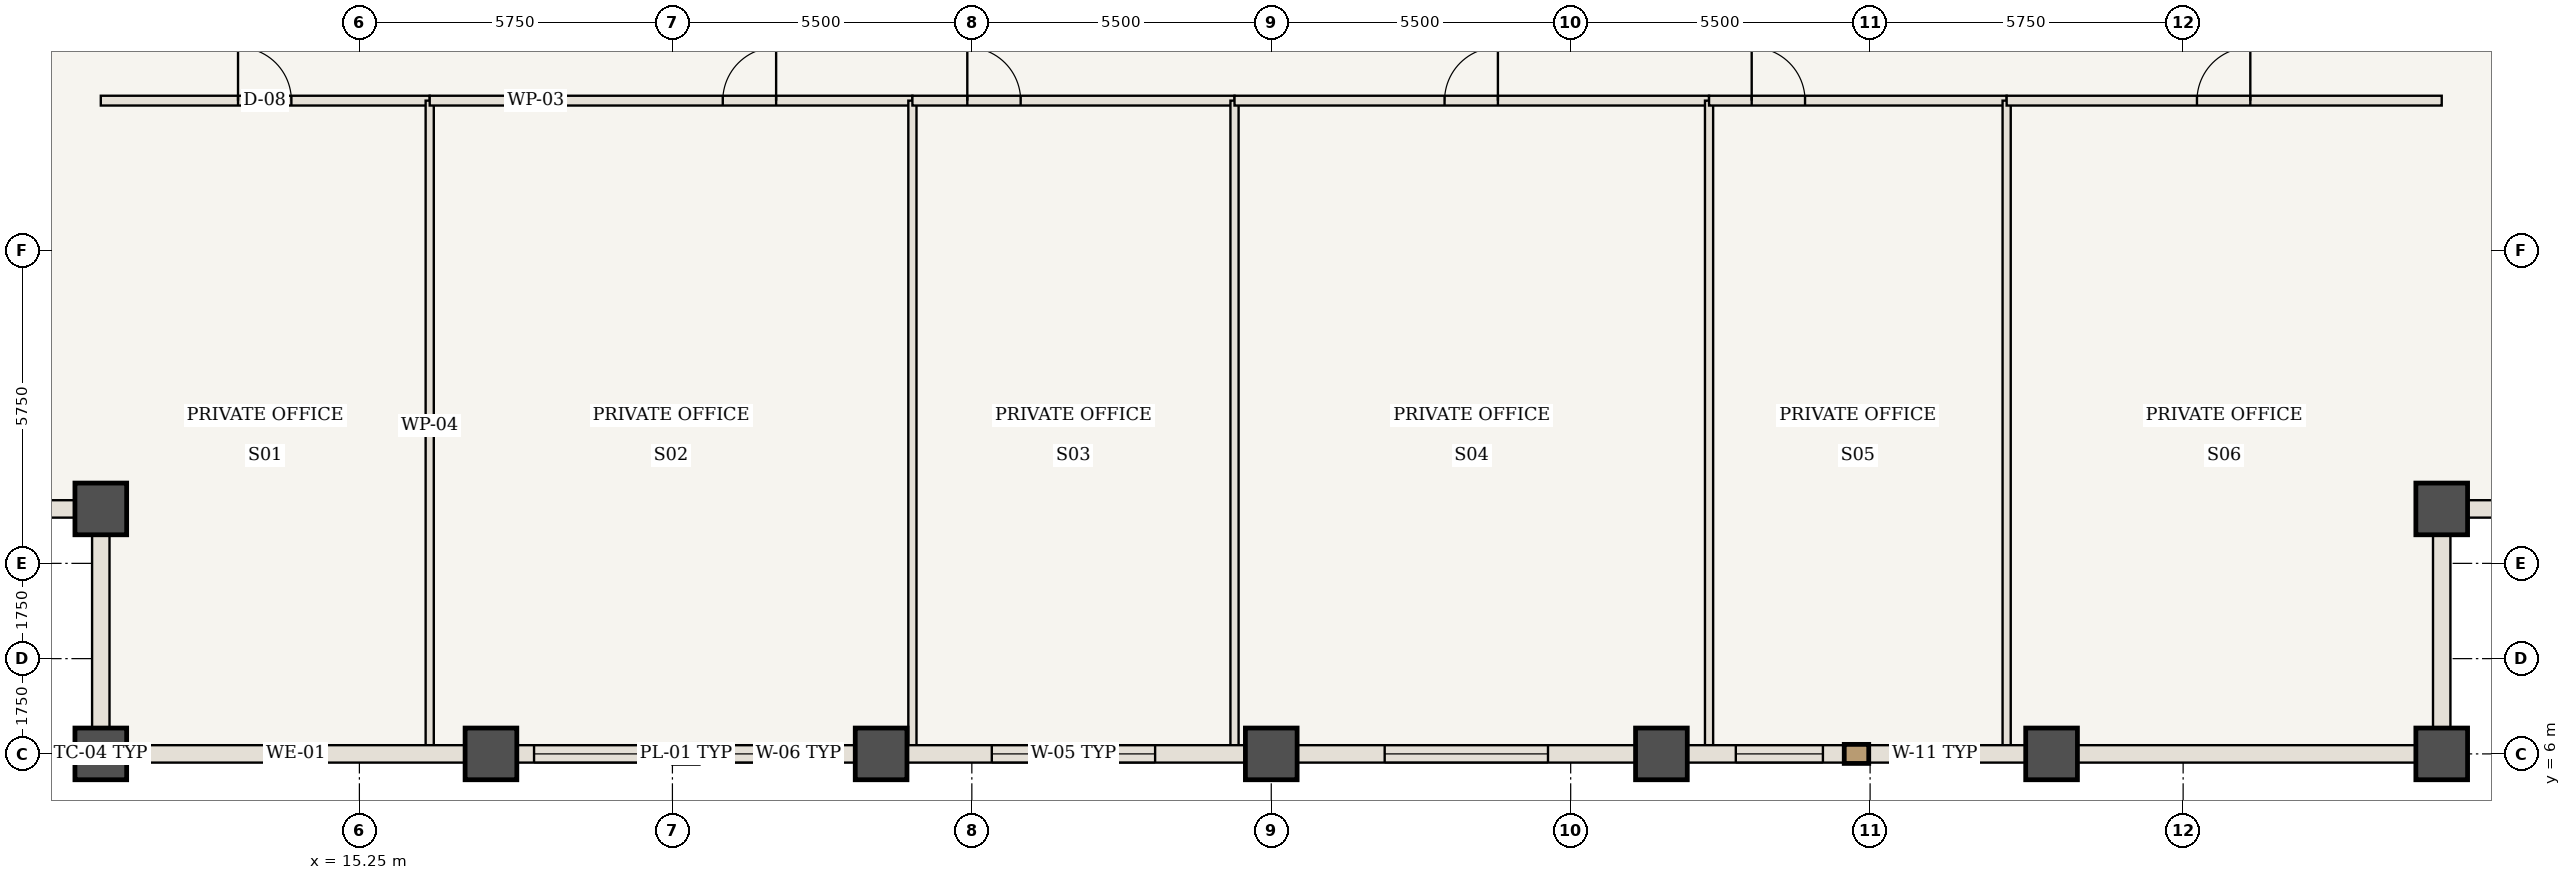
"""IFC4 building model, lengths in metres.
Left out: names, types, materials, properties, quantities, classifications, styles, units other than length and angle.
Written with IfcOpenShell. Run it as: python <this file> out.ifc"""

import sys

from ifc_helpers import new_model, si_unit, direction, frame, frame_2d, origin, origin_2d, place, context, subcontext, project, spatial, rectangle, extrude, element, fill, save


model = new_model("IFC4")
c1 = context("Model", 3, precision=1e-05, world=origin(), true_north=direction((0.0, 1.0)))
c2 = subcontext(c1, "Body", "Model", "MODEL_VIEW")
j1 = project(units=[si_unit("LENGTHUNIT", "METRE"), si_unit("PLANEANGLEUNIT", "RADIAN")], contexts=[c1])
p1 = place(None, origin())
s1 = spatial("IfcSite", under=j1, at=p1, CompositionType="ELEMENT")
p2 = place(p1, origin())
s2 = spatial("IfcBuilding", under=s1, at=p2, CompositionType="ELEMENT")
p3 = place(p2, frame((0.0, 0.0, 126.0)))
s3 = spatial("IfcBuildingStorey", under=s2, at=p3, CompositionType="ELEMENT", Elevation=126.0)
for number, where, z_axis, x_axis in (
    (1, (10.5, 6.0, 0.0), (0.0, 0.0, 1.0), (1.0, 0.0, 0.0)),
    (2, (10.5, 10.5, 0.0), (0.0, 0.0, 1.0), (1.0, 0.0, 0.0)),
    (3, (53.5, 6.0, 0.0), (0.0, 0.0, 1.0), (1.0, 0.0, 0.0)),
    (4, (53.5, 10.5, 0.0), (0.0, 0.0, 1.0), (1.0, 0.0, 0.0)),
    (5, (17.667, 6.0, 0.0), (0.0, 0.0, 1.0), (1.0, 0.0, 0.0)),
    (6, (24.833, 6.0, 0.0), (0.0, 0.0, 1.0), (1.0, 0.0, 0.0)),
    (7, (32.0, 6.0, 0.0), (0.0, 0.0, 1.0), (1.0, 0.0, 0.0)),
    (8, (39.167, 6.0, 0.0), (0.0, 0.0, 1.0), (1.0, 0.0, 0.0)),
    (9, (46.333, 6.0, 0.0), (0.0, 0.0, 1.0), (1.0, 0.0, 0.0)),
):
    element("IfcColumn", number, at=place(p3, frame(where, z_axis=z_axis, x_axis=x_axis)), inside=s3, PredefinedType="COLUMN", context=c2, shape_type="SweptSolid", body=[
        extrude(rectangle(XDim=0.95, YDim=0.95, at=origin_2d()), origin(), (0.0, 0.0, 1.0), 3.85),
    ])
p4 = place(p3, frame((10.5, 18.0, 0.0), z_axis=(0.0, 0.0, 1.0), x_axis=(1.0, 0.0, 0.0)))
e10 = element("IfcWall", 10, at=p4, inside=s3, PredefinedType="STANDARD", context=c2, shape_type="SweptSolid", body=[
    extrude(rectangle(XDim=6.042, YDim=0.18, at=frame_2d((3.021, 0.0))), origin(), (0.0, 0.0, 1.0), 3.685),
])
p5 = place(p4, frame((2.521, 0.0, 0.0)))
e11 = element("IfcOpeningElement", 11, at=p5, cuts=e10, PredefinedType="OPENING", context=c2, shape_type="SweptSolid", body=[
    extrude(rectangle(XDim=0.98, YDim=2.2, at=frame_2d((0.49, 1.1))), frame((0.0, 0.1, 0.0), z_axis=(0.0, -1.0, 0.0), x_axis=(1.0, 0.0, 0.0)), (0.0, 0.0, 1.0), 0.2),
])
p6 = place(p3, frame((16.542, 6.06, 0.0), z_axis=(0.0, 0.0, 1.0), x_axis=(0.0, 1.0, 0.0)))
e12 = element("IfcWall", 12, at=p6, inside=s3, PredefinedType="STANDARD", context=c2, shape_type="SweptSolid", body=[
    extrude(rectangle(XDim=11.94, YDim=0.15, at=frame_2d((5.97, 0.0))), origin(), (0.0, 0.0, 1.0), 3.685),
])
p7 = place(p3, frame((16.542, 18.0, 0.0), z_axis=(0.0, 0.0, 1.0), x_axis=(1.0, 0.0, 0.0)))
e13 = element("IfcWall", 13, at=p7, inside=s3, PredefinedType="STANDARD", context=c2, shape_type="SweptSolid", body=[
    extrude(rectangle(XDim=8.866, YDim=0.18, at=frame_2d((4.433, 0.0))), origin(), (0.0, 0.0, 1.0), 3.685),
])
p8 = place(p7, frame((5.383, 0.0, 0.0)))
e14 = element("IfcOpeningElement", 14, at=p8, cuts=e13, PredefinedType="OPENING", context=c2, shape_type="SweptSolid", body=[
    extrude(rectangle(XDim=0.98, YDim=2.2, at=frame_2d((0.49, 1.1))), frame((0.0, 0.1, 0.0), z_axis=(0.0, -1.0, 0.0), x_axis=(1.0, 0.0, 0.0)), (0.0, 0.0, 1.0), 0.2),
])
p9 = place(p3, frame((25.408, 6.06, 0.0), z_axis=(0.0, 0.0, 1.0), x_axis=(0.0, 1.0, 0.0)))
e15 = element("IfcWall", 15, at=p9, inside=s3, PredefinedType="STANDARD", context=c2, shape_type="SweptSolid", body=[
    extrude(rectangle(XDim=11.94, YDim=0.15, at=frame_2d((5.97, 0.0))), origin(), (0.0, 0.0, 1.0), 3.685),
])
p10 = place(p3, frame((25.408, 18.0, 0.0), z_axis=(0.0, 0.0, 1.0), x_axis=(1.0, 0.0, 0.0)))
e16 = element("IfcWall", 16, at=p10, inside=s3, PredefinedType="STANDARD", context=c2, shape_type="SweptSolid", body=[
    extrude(rectangle(XDim=5.917, YDim=0.18, at=frame_2d((2.958, 0.0))), origin(), (0.0, 0.0, 1.0), 3.685),
])
p11 = place(p10, frame((1.008, 0.0, 0.0)))
e17 = element("IfcOpeningElement", 17, at=p11, cuts=e16, PredefinedType="OPENING", context=c2, shape_type="SweptSolid", body=[
    extrude(rectangle(XDim=0.98, YDim=2.2, at=frame_2d((0.49, 1.1))), frame((0.0, 0.1, 0.0), z_axis=(0.0, -1.0, 0.0), x_axis=(1.0, 0.0, 0.0)), (0.0, 0.0, 1.0), 0.2),
])
p12 = place(p3, frame((31.325, 6.06, 0.0), z_axis=(0.0, 0.0, 1.0), x_axis=(0.0, 1.0, 0.0)))
e18 = element("IfcWall", 18, at=p12, inside=s3, PredefinedType="STANDARD", context=c2, shape_type="SweptSolid", body=[
    extrude(rectangle(XDim=11.94, YDim=0.15, at=frame_2d((5.97, 0.0))), origin(), (0.0, 0.0, 1.0), 3.685),
])
p13 = place(p3, frame((31.325, 18.0, 0.0), z_axis=(0.0, 0.0, 1.0), x_axis=(1.0, 0.0, 0.0)))
e19 = element("IfcWall", 19, at=p13, inside=s3, PredefinedType="STANDARD", context=c2, shape_type="SweptSolid", body=[
    extrude(rectangle(XDim=8.717, YDim=0.18, at=frame_2d((4.358, 0.0))), origin(), (0.0, 0.0, 1.0), 3.685),
])
p14 = place(p13, frame((3.858, 0.0, 0.0)))
e20 = element("IfcOpeningElement", 20, at=p14, cuts=e19, PredefinedType="OPENING", context=c2, shape_type="SweptSolid", body=[
    extrude(rectangle(XDim=0.98, YDim=2.2, at=frame_2d((0.49, 1.1))), frame((0.0, 0.1, 0.0), z_axis=(0.0, -1.0, 0.0), x_axis=(1.0, 0.0, 0.0)), (0.0, 0.0, 1.0), 0.2),
])
p15 = place(p3, frame((40.042, 6.06, 0.0), z_axis=(0.0, 0.0, 1.0), x_axis=(0.0, 1.0, 0.0)))
e21 = element("IfcWall", 21, at=p15, inside=s3, PredefinedType="STANDARD", context=c2, shape_type="SweptSolid", body=[
    extrude(rectangle(XDim=11.94, YDim=0.15, at=frame_2d((5.97, 0.0))), origin(), (0.0, 0.0, 1.0), 3.685),
])
p16 = place(p3, frame((40.042, 18.0, 0.0), z_axis=(0.0, 0.0, 1.0), x_axis=(1.0, 0.0, 0.0)))
e22 = element("IfcWall", 22, at=p16, inside=s3, PredefinedType="STANDARD", context=c2, shape_type="SweptSolid", body=[
    extrude(rectangle(XDim=5.467, YDim=0.18, at=frame_2d((2.733, 0.0))), origin(), (0.0, 0.0, 1.0), 3.685),
])
p17 = place(p16, frame((0.783, 0.0, 0.0)))
e23 = element("IfcOpeningElement", 23, at=p17, cuts=e22, PredefinedType="OPENING", context=c2, shape_type="SweptSolid", body=[
    extrude(rectangle(XDim=0.98, YDim=2.2, at=frame_2d((0.49, 1.1))), frame((0.0, 0.1, 0.0), z_axis=(0.0, -1.0, 0.0), x_axis=(1.0, 0.0, 0.0)), (0.0, 0.0, 1.0), 0.2),
])
p18 = place(p3, frame((45.508, 6.06, 0.0), z_axis=(0.0, 0.0, 1.0), x_axis=(0.0, 1.0, 0.0)))
e24 = element("IfcWall", 24, at=p18, inside=s3, PredefinedType="STANDARD", context=c2, shape_type="SweptSolid", body=[
    extrude(rectangle(XDim=11.94, YDim=0.15, at=frame_2d((5.97, 0.0))), origin(), (0.0, 0.0, 1.0), 3.685),
])
p19 = place(p3, frame((45.508, 18.0, 0.0), z_axis=(0.0, 0.0, 1.0), x_axis=(1.0, 0.0, 0.0)))
e25 = element("IfcWall", 25, at=p19, inside=s3, PredefinedType="STANDARD", context=c2, shape_type="SweptSolid", body=[
    extrude(rectangle(XDim=7.992, YDim=0.18, at=frame_2d((3.996, 0.0))), origin(), (0.0, 0.0, 1.0), 3.685),
])
p20 = place(p19, frame((3.496, 0.0, 0.0)))
e26 = element("IfcOpeningElement", 26, at=p20, cuts=e25, PredefinedType="OPENING", context=c2, shape_type="SweptSolid", body=[
    extrude(rectangle(XDim=0.98, YDim=2.2, at=frame_2d((0.49, 1.1))), frame((0.0, 0.1, 0.0), z_axis=(0.0, -1.0, 0.0), x_axis=(1.0, 0.0, 0.0)), (0.0, 0.0, 1.0), 0.2),
])
p21 = place(p3, frame((17.667, 6.0, 0.0), z_axis=(0.0, 0.0, 1.0), x_axis=(-1.0, 0.0, 0.0)))
e27 = element("IfcWall", 27, at=p21, inside=s3, PredefinedType="USERDEFINED", context=c2, shape_type="SweptSolid", body=[
    extrude(rectangle(XDim=7.167, YDim=0.32, at=frame_2d((3.583, 0.0))), origin(), (0.0, 0.0, 1.0), 2.885),
])
p22 = place(p3, frame((24.833, 6.0, 0.0), z_axis=(0.0, 0.0, 1.0), x_axis=(-1.0, 0.0, 0.0)))
e28 = element("IfcWall", 28, at=p22, inside=s3, PredefinedType="USERDEFINED", context=c2, shape_type="SweptSolid", body=[
    extrude(rectangle(XDim=7.167, YDim=0.32, at=frame_2d((3.583, 0.0))), origin(), (0.0, 0.0, 1.0), 2.885),
])
p23 = place(p22, frame((0.792, 0.0, 0.85)))
e29 = element("IfcOpeningElement", 29, at=p23, cuts=e28, PredefinedType="OPENING", context=c2, shape_type="SweptSolid", body=[
    extrude(rectangle(XDim=2.2, YDim=1.835, at=frame_2d((1.1, 0.917))), frame((0.0, 0.17, 0.0), z_axis=(0.0, -1.0, 0.0), x_axis=(1.0, 0.0, 0.0)), (0.0, 0.0, 1.0), 0.34),
])
p24 = place(p22, frame((4.175, 0.0, 0.85)))
e30 = element("IfcOpeningElement", 30, at=p24, cuts=e28, PredefinedType="OPENING", context=c2, shape_type="SweptSolid", body=[
    extrude(rectangle(XDim=2.2, YDim=1.835, at=frame_2d((1.1, 0.917))), frame((0.0, 0.17, 0.0), z_axis=(0.0, -1.0, 0.0), x_axis=(1.0, 0.0, 0.0)), (0.0, 0.0, 1.0), 0.34),
])
p25 = place(p3, frame((32.0, 6.0, 0.0), z_axis=(0.0, 0.0, 1.0), x_axis=(-1.0, 0.0, 0.0)))
e31 = element("IfcWall", 31, at=p25, inside=s3, PredefinedType="USERDEFINED", context=c2, shape_type="SweptSolid", body=[
    extrude(rectangle(XDim=7.167, YDim=0.32, at=frame_2d((3.583, 0.0))), origin(), (0.0, 0.0, 1.0), 2.885),
])
p26 = place(p25, frame((2.133, 0.0, 0.85)))
e32 = element("IfcOpeningElement", 32, at=p26, cuts=e31, PredefinedType="OPENING", context=c2, shape_type="SweptSolid", body=[
    extrude(rectangle(XDim=3.0, YDim=1.835, at=frame_2d((1.5, 0.917))), frame((0.0, 0.17, 0.0), z_axis=(0.0, -1.0, 0.0), x_axis=(1.0, 0.0, 0.0)), (0.0, 0.0, 1.0), 0.34),
])
p27 = place(p3, frame((39.167, 6.0, 0.0), z_axis=(0.0, 0.0, 1.0), x_axis=(-1.0, 0.0, 0.0)))
e33 = element("IfcWall", 33, at=p27, inside=s3, PredefinedType="USERDEFINED", context=c2, shape_type="SweptSolid", body=[
    extrude(rectangle(XDim=7.167, YDim=0.32, at=frame_2d((3.583, 0.0))), origin(), (0.0, 0.0, 1.0), 2.885),
])
p28 = place(p27, frame((2.083, 0.0, 0.85)))
e34 = element("IfcOpeningElement", 34, at=p28, cuts=e33, PredefinedType="OPENING", context=c2, shape_type="SweptSolid", body=[
    extrude(rectangle(XDim=3.0, YDim=1.835, at=frame_2d((1.5, 0.917))), frame((0.0, 0.17, 0.0), z_axis=(0.0, -1.0, 0.0), x_axis=(1.0, 0.0, 0.0)), (0.0, 0.0, 1.0), 0.34),
])
p29 = place(p3, frame((46.333, 6.0, 0.0), z_axis=(0.0, 0.0, 1.0), x_axis=(-1.0, 0.0, 0.0)))
e35 = element("IfcWall", 35, at=p29, inside=s3, PredefinedType="USERDEFINED", context=c2, shape_type="SweptSolid", body=[
    extrude(rectangle(XDim=7.167, YDim=0.32, at=frame_2d((3.583, 0.0))), origin(), (0.0, 0.0, 1.0), 2.885),
])
p30 = place(p29, frame((1.342, 0.0, 0.85)))
e36 = element("IfcOpeningElement", 36, at=p30, cuts=e35, PredefinedType="OPENING", context=c2, shape_type="SweptSolid", body=[
    extrude(rectangle(XDim=1.6, YDim=1.835, at=frame_2d((0.8, 0.917))), frame((0.0, 0.17, 0.0), z_axis=(0.0, -1.0, 0.0), x_axis=(1.0, 0.0, 0.0)), (0.0, 0.0, 1.0), 0.34),
])
p31 = place(p29, frame((4.2, 0.0, 0.85)))
e37 = element("IfcOpeningElement", 37, at=p31, cuts=e35, PredefinedType="OPENING", context=c2, shape_type="SweptSolid", body=[
    extrude(rectangle(XDim=1.6, YDim=1.835, at=frame_2d((0.8, 0.917))), frame((0.0, 0.17, 0.0), z_axis=(0.0, -1.0, 0.0), x_axis=(1.0, 0.0, 0.0)), (0.0, 0.0, 1.0), 0.34),
])
p32 = place(p3, frame((53.5, 6.0, 0.0), z_axis=(0.0, 0.0, 1.0), x_axis=(-1.0, 0.0, 0.0)))
e38 = element("IfcWall", 38, at=p32, inside=s3, PredefinedType="USERDEFINED", context=c2, shape_type="SweptSolid", body=[
    extrude(rectangle(XDim=7.167, YDim=0.32, at=frame_2d((3.583, 0.0))), origin(), (0.0, 0.0, 1.0), 2.885),
])
for number, where, z_axis, x_axis in (
    (39, (10.5, 6.0, 0.0), (0.0, 0.0, 1.0), (0.0, 1.0, 0.0)),
    (40, (10.5, 10.5, 0.0), (0.0, 0.0, 1.0), (-1.0, 0.0, 0.0)),
    (41, (53.5, 10.5, 0.0), (0.0, 0.0, 1.0), (0.0, -1.0, 0.0)),
    (42, (58.0, 10.5, 0.0), (0.0, 0.0, 1.0), (-1.0, 0.0, 0.0)),
):
    element("IfcWall", number, at=place(p3, frame(where, z_axis=z_axis, x_axis=x_axis)), inside=s3, PredefinedType="USERDEFINED", context=c2, shape_type="SweptSolid", body=[
        extrude(rectangle(XDim=4.5, YDim=0.32, at=frame_2d((2.25, 0.0))), origin(), (0.0, 0.0, 1.0), 2.885),
    ])
p33 = place(p5, origin())
e43 = element("IfcDoor", 43, at=p33, inside=s3, OperationType="SINGLE_SWING_LEFT", PredefinedType="DOOR", context=c2, shape_type="SweptSolid", body=[
    extrude(rectangle(XDim=0.98, YDim=2.2, at=frame_2d((0.49, 1.1))), frame((0.0, 0.025, 0.0), z_axis=(0.0, -1.0, 0.0), x_axis=(1.0, 0.0, 0.0)), (0.0, 0.0, 1.0), 0.05),
])
fill(e11, e43)
p34 = place(p8, origin())
e44 = element("IfcDoor", 44, at=p34, inside=s3, OperationType="SINGLE_SWING_RIGHT", PredefinedType="DOOR", context=c2, shape_type="SweptSolid", body=[
    extrude(rectangle(XDim=0.98, YDim=2.2, at=frame_2d((0.49, 1.1))), frame((0.0, 0.025, 0.0), z_axis=(0.0, -1.0, 0.0), x_axis=(1.0, 0.0, 0.0)), (0.0, 0.0, 1.0), 0.05),
])
fill(e14, e44)
p35 = place(p11, origin())
e45 = element("IfcDoor", 45, at=p35, inside=s3, OperationType="SINGLE_SWING_LEFT", PredefinedType="DOOR", context=c2, shape_type="SweptSolid", body=[
    extrude(rectangle(XDim=0.98, YDim=2.2, at=frame_2d((0.49, 1.1))), frame((0.0, 0.025, 0.0), z_axis=(0.0, -1.0, 0.0), x_axis=(1.0, 0.0, 0.0)), (0.0, 0.0, 1.0), 0.05),
])
fill(e17, e45)
p36 = place(p14, origin())
e46 = element("IfcDoor", 46, at=p36, inside=s3, OperationType="SINGLE_SWING_RIGHT", PredefinedType="DOOR", context=c2, shape_type="SweptSolid", body=[
    extrude(rectangle(XDim=0.98, YDim=2.2, at=frame_2d((0.49, 1.1))), frame((0.0, 0.025, 0.0), z_axis=(0.0, -1.0, 0.0), x_axis=(1.0, 0.0, 0.0)), (0.0, 0.0, 1.0), 0.05),
])
fill(e20, e46)
p37 = place(p17, origin())
e47 = element("IfcDoor", 47, at=p37, inside=s3, OperationType="SINGLE_SWING_LEFT", PredefinedType="DOOR", context=c2, shape_type="SweptSolid", body=[
    extrude(rectangle(XDim=0.98, YDim=2.2, at=frame_2d((0.49, 1.1))), frame((0.0, 0.025, 0.0), z_axis=(0.0, -1.0, 0.0), x_axis=(1.0, 0.0, 0.0)), (0.0, 0.0, 1.0), 0.05),
])
fill(e23, e47)
p38 = place(p20, origin())
e48 = element("IfcDoor", 48, at=p38, inside=s3, OperationType="SINGLE_SWING_RIGHT", PredefinedType="DOOR", context=c2, shape_type="SweptSolid", body=[
    extrude(rectangle(XDim=0.98, YDim=2.2, at=frame_2d((0.49, 1.1))), frame((0.0, 0.025, 0.0), z_axis=(0.0, -1.0, 0.0), x_axis=(1.0, 0.0, 0.0)), (0.0, 0.0, 1.0), 0.05),
])
fill(e26, e48)
p39 = place(p23, origin())
e49 = element("IfcWindow", 49, at=p39, inside=s3, PartitioningType="SINGLE_PANEL", PredefinedType="WINDOW", context=c2, shape_type="SweptSolid", body=[
    extrude(rectangle(XDim=2.2, YDim=1.835, at=frame_2d((1.1, 0.917))), frame((0.0, 0.03, 0.0), z_axis=(0.0, -1.0, 0.0), x_axis=(1.0, 0.0, 0.0)), (0.0, 0.0, 1.0), 0.06),
])
fill(e29, e49)
p40 = place(p24, origin())
e50 = element("IfcWindow", 50, at=p40, inside=s3, PartitioningType="SINGLE_PANEL", PredefinedType="WINDOW", context=c2, shape_type="SweptSolid", body=[
    extrude(rectangle(XDim=2.2, YDim=1.835, at=frame_2d((1.1, 0.917))), frame((0.0, 0.03, 0.0), z_axis=(0.0, -1.0, 0.0), x_axis=(1.0, 0.0, 0.0)), (0.0, 0.0, 1.0), 0.06),
])
fill(e30, e50)
p41 = place(p26, origin())
e51 = element("IfcWindow", 51, at=p41, inside=s3, PartitioningType="SINGLE_PANEL", PredefinedType="WINDOW", context=c2, shape_type="SweptSolid", body=[
    extrude(rectangle(XDim=3.0, YDim=1.835, at=frame_2d((1.5, 0.917))), frame((0.0, 0.03, 0.0), z_axis=(0.0, -1.0, 0.0), x_axis=(1.0, 0.0, 0.0)), (0.0, 0.0, 1.0), 0.06),
])
fill(e32, e51)
p42 = place(p28, origin())
e52 = element("IfcWindow", 52, at=p42, inside=s3, PartitioningType="SINGLE_PANEL", PredefinedType="WINDOW", context=c2, shape_type="SweptSolid", body=[
    extrude(rectangle(XDim=3.0, YDim=1.835, at=frame_2d((1.5, 0.917))), frame((0.0, 0.03, 0.0), z_axis=(0.0, -1.0, 0.0), x_axis=(1.0, 0.0, 0.0)), (0.0, 0.0, 1.0), 0.06),
])
fill(e34, e52)
p43 = place(p30, origin())
e53 = element("IfcWindow", 53, at=p43, inside=s3, PartitioningType="SINGLE_PANEL", PredefinedType="WINDOW", context=c2, shape_type="SweptSolid", body=[
    extrude(rectangle(XDim=1.6, YDim=1.835, at=frame_2d((0.8, 0.917))), frame((0.0, 0.03, 0.0), z_axis=(0.0, -1.0, 0.0), x_axis=(1.0, 0.0, 0.0)), (0.0, 0.0, 1.0), 0.06),
])
fill(e36, e53)
p44 = place(p31, origin())
e54 = element("IfcWindow", 54, at=p44, inside=s3, PartitioningType="SINGLE_PANEL", PredefinedType="WINDOW", context=c2, shape_type="SweptSolid", body=[
    extrude(rectangle(XDim=1.6, YDim=1.835, at=frame_2d((0.8, 0.917))), frame((0.0, 0.03, 0.0), z_axis=(0.0, -1.0, 0.0), x_axis=(1.0, 0.0, 0.0)), (0.0, 0.0, 1.0), 0.06),
])
fill(e37, e54)
save(model, sys.argv[1])
